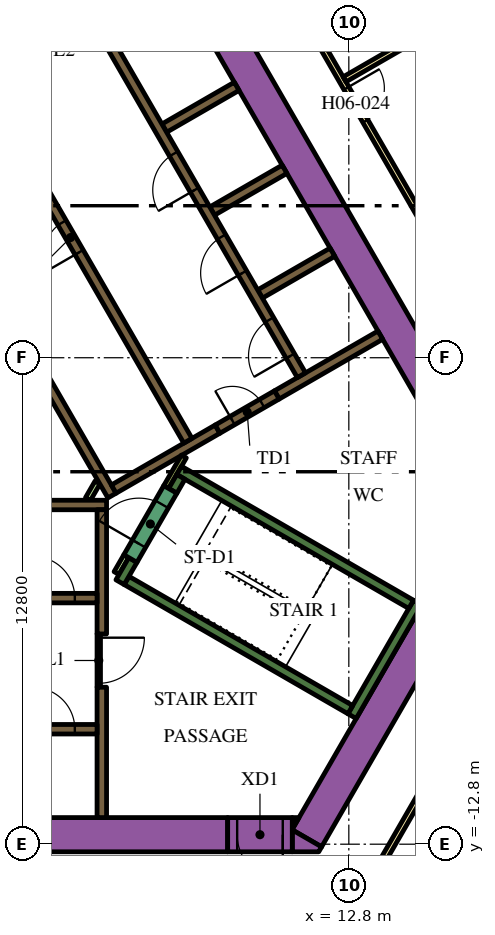
"""IFC4 building model, lengths in metres.
Left out: names, types, materials, properties, quantities, classifications, styles, units other than length and angle.
Written with IfcOpenShell. Run it as: python <this file> out.ifc"""

import sys

from ifc_helpers import new_model, si_unit, direction, frame, frame_2d, origin, place, context, subcontext, project, spatial, polyline, rectangle, outline, extrude, element, fill, save


model = new_model("IFC4")
c1 = context("Model", 3, precision=1e-05, world=origin(), true_north=direction((0.0, 1.0)))
c2 = subcontext(c1, "Body", "Model", "MODEL_VIEW")
j1 = project(units=[si_unit("LENGTHUNIT", "METRE"), si_unit("PLANEANGLEUNIT", "RADIAN")], contexts=[c1])
p1 = place(None, origin())
s1 = spatial("IfcSite", under=j1, at=p1, CompositionType="ELEMENT")
p2 = place(p1, origin())
s2 = spatial("IfcBuilding", under=s1, at=p2, CompositionType="ELEMENT")
p3 = place(p2, frame((0.0, 0.0, 87.6)))
s3 = spatial("IfcBuildingStorey", under=s2, at=p3, CompositionType="ELEMENT", Elevation=87.6)
p4 = place(p3, frame((6.776, 13.364, 0.0), z_axis=(0.0, 0.0, 1.0), x_axis=(0.500004177138, -0.8660229921, 0.0)))
e1 = element("IfcWall", 1, at=p4, inside=s3, PredefinedType="SOLIDWALL", context=c2, shape_type="SweptSolid", body=[
    extrude(rectangle(XDim=20.204, YDim=0.9, at=frame_2d((10.102, 0.0))), origin(), (0.0, 0.0, 1.0), 3.9),
])
p5 = place(p3, frame((11.695, -12.644, 0.0), z_axis=(0.0, 0.0, 1.0), x_axis=(0.500010229568, 0.86601949766, 0.0)))
e2 = element("IfcWall", 2, at=p5, inside=s3, PredefinedType="SOLIDWALL", context=c2, shape_type="SweptSolid", body=[
    extrude(rectangle(XDim=9.326, YDim=0.9, at=frame_2d((4.663, 0.0))), origin(), (0.0, 0.0, 1.0), 3.9),
])
p6 = place(p3, origin())
e3 = element("IfcWall", 3, at=p6, inside=s3, PredefinedType="SOLIDWALL", context=c2, shape_type="SweptSolid", body=[
    extrude(outline(polyline([(12.009, -13.0), (11.312, -13.0), (11.312, -12.425), (12.083, -12.871), (12.009, -13.0)])), origin(), (0.0, 0.0, 1.0), 3.9),
])
e4 = element("IfcWall", 4, at=p6, inside=s3, PredefinedType="SOLIDWALL", context=c2, shape_type="SweptSolid", body=[
    extrude(outline(polyline([(11.489, -12.1), (11.312, -12.407), (11.312, -12.1), (11.489, -12.1)])), origin(), (0.0, 0.0, 1.0), 3.9),
])
p7 = place(p3, frame((-12.019, -12.55, 0.0), z_axis=(0.0, 0.0, 1.0), x_axis=(1.0, 0.0, 0.0)))
e5 = element("IfcWall", 5, at=p7, inside=s3, PredefinedType="SOLIDWALL", context=c2, shape_type="SweptSolid", body=[
    extrude(rectangle(XDim=21.63, YDim=0.9, at=frame_2d((10.815, 0.0))), origin(), (0.0, 0.0, 1.0), 3.9),
])
p8 = place(p3, frame((12.885, -9.431, 0.0), z_axis=(0.0, 0.0, 1.0), x_axis=(0.500020560727, 0.866013532718, 0.0)))
e6 = element("IfcWall", 6, at=p8, inside=s3, PredefinedType="SOLIDWALL", context=c2, shape_type="SweptSolid", body=[
    extrude(rectangle(XDim=3.45, YDim=0.25, at=frame_2d((1.725, 0.0))), origin(), (0.0, 0.0, 1.0), 3.9),
])
p9 = place(p3, frame((12.84, -9.261, 0.0), z_axis=(0.0, 0.0, 1.0), x_axis=(-0.866013990052, 0.500019768644, 0.0)))
e7 = element("IfcWall", 7, at=p9, inside=s3, PredefinedType="SOLIDWALL", context=c2, shape_type="SweptSolid", body=[
    extrude(rectangle(XDim=6.8, YDim=0.25, at=frame_2d((3.4, 0.0))), origin(), (0.0, 0.0, 1.0), 3.9),
])
p10 = place(p3, frame((6.78, -5.906, 0.0), z_axis=(0.0, 0.0, 1.0), x_axis=(0.500223362819, 0.865896406789, 0.0)))
e8 = element("IfcWall", 8, at=p10, inside=s3, PredefinedType="SOLIDWALL", context=c2, shape_type="SweptSolid", body=[
    extrude(rectangle(XDim=0.675, YDim=0.25, at=frame_2d((0.337, 0.0))), origin(), (0.0, 0.0, 1.0), 3.9),
])
p11 = place(p3, frame((8.334, -2.964, 0.0), z_axis=(0.0, 0.0, 1.0), x_axis=(0.866016039709, -0.500016218704, 0.0)))
e9 = element("IfcWall", 9, at=p11, inside=s3, PredefinedType="SOLIDWALL", context=c2, shape_type="SweptSolid", body=[
    extrude(rectangle(XDim=7.05, YDim=0.25, at=frame_2d((3.525, 0.0))), origin(), (0.0, 0.0, 1.0), 3.9),
])
p12 = place(p3, frame((8.168, -3.503, 0.0), z_axis=(0.0, 0.0, 1.0), x_axis=(0.49972245349, 0.866185586049, 0.0)))
e10 = element("IfcWall", 10, at=p12, inside=s3, PredefinedType="SOLIDWALL", context=c2, shape_type="SweptSolid", body=[
    extrude(rectangle(XDim=0.425, YDim=0.25, at=frame_2d((0.212, 0.0))), origin(), (0.0, 0.0, 1.0), 3.9),
])
p13 = place(p3, frame((-5.845, -3.875, 0.0), z_axis=(0.0, 0.0, 1.0), x_axis=(1.0, 0.0, 0.0)))
e11 = element("IfcWall", 11, at=p13, inside=s3, PredefinedType="SOLIDWALL", context=c2, shape_type="SweptSolid", body=[
    extrude(rectangle(XDim=12.27, YDim=0.25, at=frame_2d((6.135, 0.0))), origin(), (0.0, 0.0, 1.0), 3.9),
])
p14 = place(p3, frame((6.3, -8.67, 0.0), z_axis=(0.0, 0.0, 1.0), x_axis=(0.0, -1.0, 0.0)))
e12 = element("IfcWall", 12, at=p14, inside=s3, PredefinedType="SOLIDWALL", context=c2, shape_type="SweptSolid", body=[
    extrude(rectangle(XDim=3.43, YDim=0.25, at=frame_2d((1.715, 0.0))), origin(), (0.0, 0.0, 1.0), 3.9),
])
p15 = place(p3, frame((6.3, -7.268, 0.0), z_axis=(0.0, 0.0, 1.0), x_axis=(0.0, 1.0, 0.0)))
e13 = element("IfcWall", 13, at=p15, inside=s3, PredefinedType="SOLIDWALL", context=c2, shape_type="SweptSolid", body=[
    extrude(rectangle(XDim=3.268, YDim=0.25, at=frame_2d((1.634, 0.0))), origin(), (0.0, 0.0, 1.0), 3.9),
])
p16 = place(p3, frame((10.464, 1.677, 0.0), z_axis=(0.0, 0.0, 1.0), x_axis=(0.86605622881, 0.499946605688, 0.0)))
e14 = element("IfcWall", 14, at=p16, inside=s3, PredefinedType="SOLIDWALL", context=c2, shape_type="SweptSolid", body=[
    extrude(rectangle(XDim=2.2, YDim=0.25, at=frame_2d((1.1, 0.0))), origin(), (0.0, 0.0, 1.0), 3.9),
])
p17 = place(p3, frame((13.629, 0.594, 0.0), z_axis=(0.0, 0.0, 1.0), x_axis=(-0.86602790099, -0.499995674689, 0.0)))
e15 = element("IfcWall", 15, at=p17, inside=s3, PredefinedType="SOLIDWALL", context=c2, shape_type="SweptSolid", body=[
    extrude(rectangle(XDim=3.146, YDim=0.25, at=frame_2d((1.573, 0.0))), origin(), (0.0, 0.0, 1.0), 3.9),
])
e16 = element("IfcWall", 16, at=p6, inside=s3, PredefinedType="SOLIDWALL", context=c2, shape_type="SweptSolid", body=[
    extrude(outline(polyline([(0.335, 6.925), (0.335, 7.075), (0.335, 7.075), (0.335, 7.075), (0.245, 7.075), (0.079, 7.363), (0.035, 7.439), (0.252, 7.564), (0.377, 7.348), (6.552, -3.348), (6.677, -3.564), (6.46, -3.689), (4.897, -0.981), (0.332, 6.925), (0.335, 6.925), (0.335, 6.925), (0.335, 6.925)])), origin(), (0.0, 0.0, 1.0), 3.9),
])
p18 = place(p3, frame((6.614, -3.456, 0.0), z_axis=(0.0, 0.0, 1.0), x_axis=(0.86602447079, 0.500001615989, 0.0)))
e17 = element("IfcWall", 17, at=p18, inside=s3, PredefinedType="SOLIDWALL", context=c2, shape_type="SweptSolid", body=[
    extrude(rectangle(XDim=3.154, YDim=0.25, at=frame_2d((1.577, 0.0))), origin(), (0.0, 0.0, 1.0), 3.9),
])
for number, where, z_axis, x_axis in (
    (18, (7.944, 6.041, 0.0), (0.0, 0.0, 1.0), (0.866, 0.5, 0.0)),
    (19, (9.204, 3.859, 0.0), (0.0, 0.0, 1.0), (0.866, 0.5, 0.0)),
):
    element("IfcWall", number, at=place(p3, frame(where, z_axis=z_axis, x_axis=x_axis)), inside=s3, PredefinedType="SOLIDWALL", context=c2, shape_type="SweptSolid", body=[
        extrude(rectangle(XDim=2.2, YDim=0.25, at=frame_2d((1.1, 0.0))), origin(), (0.0, 0.0, 1.0), 3.9),
    ])
p19 = place(p3, frame((6.945, -5.222, 0.0), z_axis=(0.0, 0.0, 1.0), x_axis=(-0.499818422106, -0.866130212453, 0.0)))
e20 = element("IfcWall", 20, at=p19, inside=s3, PredefinedType="PARTITIONING", context=c2, shape_type="SweptSolid", body=[
    extrude(rectangle(XDim=0.514, YDim=0.15, at=frame_2d((0.257, 0.0))), origin(), (0.0, 0.0, 1.0), 2.75),
])
p20 = place(p3, frame((5.936, -3.718, 0.0), z_axis=(0.0, 0.0, 1.0), x_axis=(0.499890179513, 0.866088799389, 0.0)))
e21 = element("IfcWall", 21, at=p20, inside=s3, PredefinedType="PARTITIONING", context=c2, shape_type="SweptSolid", body=[
    extrude(rectangle(XDim=0.504, YDim=0.15, at=frame_2d((0.252, 0.0))), origin(), (0.0, 0.0, 1.0), 2.75),
])
p21 = place(p3, frame((8.459, -2.599, 0.0), z_axis=(0.0, 0.0, 1.0), x_axis=(-0.500041054325, -0.866001699761, 0.0)))
e22 = element("IfcWall", 22, at=p21, inside=s3, PredefinedType="PARTITIONING", context=c2, shape_type="SweptSolid", body=[
    extrude(rectangle(XDim=0.929, YDim=0.15, at=frame_2d((0.464, 0.0))), origin(), (0.0, 0.0, 1.0), 3.9),
])
p22 = place(p3, frame((-6.175, -9.775, 0.0), z_axis=(0.0, 0.0, 1.0), x_axis=(1.0, 0.0, 0.0)))
e23 = element("IfcWall", 23, at=p22, inside=s3, PredefinedType="SOLIDWALL", context=c2, shape_type="SweptSolid", body=[
    extrude(rectangle(XDim=12.35, YDim=0.25, at=frame_2d((6.175, 0.0))), origin(), (0.0, 0.0, 1.0), 3.9),
])
p23 = place(p22, frame((0.585, 0.0, 0.0)))
e24 = element("IfcOpeningElement", 24, at=p23, cuts=e23, PredefinedType="OPENING", context=c2, shape_type="SweptSolid", body=[
    extrude(rectangle(XDim=1.1, YDim=2.1, at=frame_2d((0.55, 1.05))), frame((0.0, 0.135, 0.0), z_axis=(0.0, -1.0, 0.0), x_axis=(1.0, 0.0, 0.0)), (0.0, 0.0, 1.0), 0.27),
])
p24 = place(p22, frame((3.105, 0.0, 0.0)))
e25 = element("IfcOpeningElement", 25, at=p24, cuts=e23, PredefinedType="OPENING", context=c2, shape_type="SweptSolid", body=[
    extrude(rectangle(XDim=1.1, YDim=2.1, at=frame_2d((0.55, 1.05))), frame((0.0, 0.135, 0.0), z_axis=(0.0, -1.0, 0.0), x_axis=(1.0, 0.0, 0.0)), (0.0, 0.0, 1.0), 0.27),
])
p25 = place(p22, frame((5.625, 0.0, 0.0)))
e26 = element("IfcOpeningElement", 26, at=p25, cuts=e23, PredefinedType="OPENING", context=c2, shape_type="SweptSolid", body=[
    extrude(rectangle(XDim=1.1, YDim=2.1, at=frame_2d((0.55, 1.05))), frame((0.0, 0.135, 0.0), z_axis=(0.0, -1.0, 0.0), x_axis=(1.0, 0.0, 0.0)), (0.0, 0.0, 1.0), 0.27),
])
p26 = place(p22, frame((8.145, 0.0, 0.0)))
e27 = element("IfcOpeningElement", 27, at=p26, cuts=e23, PredefinedType="OPENING", context=c2, shape_type="SweptSolid", body=[
    extrude(rectangle(XDim=1.1, YDim=2.1, at=frame_2d((0.55, 1.05))), frame((0.0, 0.135, 0.0), z_axis=(0.0, -1.0, 0.0), x_axis=(1.0, 0.0, 0.0)), (0.0, 0.0, 1.0), 0.27),
])
p27 = place(p22, frame((10.665, 0.0, 0.0)))
e28 = element("IfcOpeningElement", 28, at=p27, cuts=e23, PredefinedType="OPENING", context=c2, shape_type="SweptSolid", body=[
    extrude(rectangle(XDim=1.1, YDim=2.1, at=frame_2d((0.55, 1.05))), frame((0.0, 0.135, 0.0), z_axis=(0.0, -1.0, 0.0), x_axis=(1.0, 0.0, 0.0)), (0.0, 0.0, 1.0), 0.27),
])
p28 = place(p3, frame((-6.175, -6.325, 0.0), z_axis=(0.0, 0.0, 1.0), x_axis=(1.0, 0.0, 0.0)))
e29 = element("IfcWall", 29, at=p28, inside=s3, PredefinedType="SOLIDWALL", context=c2, shape_type="SweptSolid", body=[
    extrude(rectangle(XDim=12.35, YDim=0.25, at=frame_2d((6.175, 0.0))), origin(), (0.0, 0.0, 1.0), 3.9),
])
p29 = place(p28, frame((3.205, 0.0, 0.0)))
e30 = element("IfcOpeningElement", 30, at=p29, cuts=e29, PredefinedType="OPENING", context=c2, shape_type="SweptSolid", body=[
    extrude(rectangle(XDim=0.9, YDim=2.1, at=frame_2d((0.45, 1.05))), frame((0.0, 0.135, 0.0), z_axis=(0.0, -1.0, 0.0), x_axis=(1.0, 0.0, 0.0)), (0.0, 0.0, 1.0), 0.27),
])
p30 = place(p28, frame((8.145, 0.0, 0.0)))
e31 = element("IfcOpeningElement", 31, at=p30, cuts=e29, PredefinedType="OPENING", context=c2, shape_type="SweptSolid", body=[
    extrude(rectangle(XDim=1.1, YDim=2.1, at=frame_2d((0.55, 1.05))), frame((0.0, 0.135, 0.0), z_axis=(0.0, -1.0, 0.0), x_axis=(1.0, 0.0, 0.0)), (0.0, 0.0, 1.0), 0.27),
])
p31 = place(p28, frame((10.665, 0.0, 0.0)))
e32 = element("IfcOpeningElement", 32, at=p31, cuts=e29, PredefinedType="OPENING", context=c2, shape_type="SweptSolid", body=[
    extrude(rectangle(XDim=1.1, YDim=2.1, at=frame_2d((0.55, 1.05))), frame((0.0, 0.135, 0.0), z_axis=(0.0, -1.0, 0.0), x_axis=(1.0, 0.0, 0.0)), (0.0, 0.0, 1.0), 0.27),
])
p32 = place(p3, frame((11.553, -0.46, 0.0), z_axis=(0.0, 0.0, 1.0), x_axis=(-0.500006514828, 0.866021642414, 0.0)))
e33 = element("IfcWall", 33, at=p32, inside=s3, PredefinedType="SOLIDWALL", context=c2, shape_type="SweptSolid", body=[
    extrude(rectangle(XDim=12.35, YDim=0.25, at=frame_2d((6.175, 0.0))), origin(), (0.0, 0.0, 1.0), 3.9),
])
p33 = place(p32, frame((0.585, 0.0, 0.0)))
e34 = element("IfcOpeningElement", 34, at=p33, cuts=e33, PredefinedType="OPENING", context=c2, shape_type="SweptSolid", body=[
    extrude(rectangle(XDim=1.1, YDim=2.1, at=frame_2d((0.55, 1.05))), frame((0.0, 0.135, 0.0), z_axis=(0.0, -1.0, 0.0), x_axis=(1.0, 0.0, 0.0)), (0.0, 0.0, 1.0), 0.27),
])
p34 = place(p32, frame((3.105, 0.0, 0.0)))
e35 = element("IfcOpeningElement", 35, at=p34, cuts=e33, PredefinedType="OPENING", context=c2, shape_type="SweptSolid", body=[
    extrude(rectangle(XDim=1.1, YDim=2.1, at=frame_2d((0.55, 1.05))), frame((0.0, 0.135, 0.0), z_axis=(0.0, -1.0, 0.0), x_axis=(1.0, 0.0, 0.0)), (0.0, 0.0, 1.0), 0.27),
])
p35 = place(p32, frame((5.625, 0.0, 0.0)))
e36 = element("IfcOpeningElement", 36, at=p35, cuts=e33, PredefinedType="OPENING", context=c2, shape_type="SweptSolid", body=[
    extrude(rectangle(XDim=1.1, YDim=2.1, at=frame_2d((0.55, 1.05))), frame((0.0, 0.135, 0.0), z_axis=(0.0, -1.0, 0.0), x_axis=(1.0, 0.0, 0.0)), (0.0, 0.0, 1.0), 0.27),
])
p36 = place(p3, frame((8.565, -2.185, 0.0), z_axis=(0.0, 0.0, 1.0), x_axis=(-0.499997954832, 0.866026584559, 0.0)))
e37 = element("IfcWall", 37, at=p36, inside=s3, PredefinedType="SOLIDWALL", context=c2, shape_type="SweptSolid", body=[
    extrude(rectangle(XDim=12.35, YDim=0.25, at=frame_2d((6.175, 0.0))), origin(), (0.0, 0.0, 1.0), 3.9),
])
p37 = place(p36, frame((5.725, 0.0, 0.0)))
e38 = element("IfcOpeningElement", 38, at=p37, cuts=e37, PredefinedType="OPENING", context=c2, shape_type="SweptSolid", body=[
    extrude(rectangle(XDim=0.9, YDim=2.1, at=frame_2d((0.45, 1.05))), frame((0.0, 0.135, 0.0), z_axis=(0.0, -1.0, 0.0), x_axis=(1.0, 0.0, 0.0)), (0.0, 0.0, 1.0), 0.27),
])
p38 = place(p3, frame((7.053, -5.284, 0.0), z_axis=(0.0, 0.0, 1.0), x_axis=(0.500078061341, 0.865980330357, 0.0)))
e39 = element("IfcWall", 39, at=p38, inside=s3, PredefinedType="SOLIDWALL", context=c2, shape_type="SweptSolid", body=[
    extrude(rectangle(XDim=2.1, YDim=0.4, at=frame_2d((1.05, 0.0))), origin(), (0.0, 0.0, 1.0), 3.9),
])
p39 = place(p38, frame((0.45, 0.0, 0.0)))
e40 = element("IfcOpeningElement", 40, at=p39, cuts=e39, PredefinedType="OPENING", context=c2, shape_type="SweptSolid", body=[
    extrude(rectangle(XDim=1.2, YDim=2.1, at=frame_2d((0.6, 1.05))), frame((0.0, 0.21, 0.0), z_axis=(0.0, -1.0, 0.0), x_axis=(1.0, 0.0, 0.0)), (0.0, 0.0, 1.0), 0.42),
])
p40 = place(p3, frame((9.346, -1.879, 0.0), z_axis=(0.0, 0.0, 1.0), x_axis=(0.866047807691, 0.499961193289, 0.0)))
e41 = element("IfcWall", 41, at=p40, inside=s3, PredefinedType="SOLIDWALL", context=c2, shape_type="SweptSolid", body=[
    extrude(rectangle(XDim=1.8, YDim=0.25, at=frame_2d((0.9, 0.0))), origin(), (0.0, 0.0, 1.0), 3.9),
])
p41 = place(p40, frame((0.45, 0.0, 0.0)))
e42 = element("IfcOpeningElement", 42, at=p41, cuts=e41, PredefinedType="OPENING", context=c2, shape_type="SweptSolid", body=[
    extrude(rectangle(XDim=0.9, YDim=2.1, at=frame_2d((0.45, 1.05))), frame((0.0, 0.135, 0.0), z_axis=(0.0, -1.0, 0.0), x_axis=(1.0, 0.0, 0.0)), (0.0, 0.0, 1.0), 0.27),
])
p42 = place(p3, frame((6.22, -7.266, 0.0), z_axis=(0.0, 0.0, 1.0), x_axis=(0.0, -1.0, 0.0)))
e43 = element("IfcWall", 43, at=p42, inside=s3, PredefinedType="PARTITIONING", context=c2, shape_type="SweptSolid", body=[
    extrude(rectangle(XDim=1.4, YDim=0.09, at=frame_2d((0.7, 0.0))), origin(), (0.0, 0.0, 1.0), 2.75),
])
p43 = place(p42, frame((0.1, 0.0, 0.0)))
e44 = element("IfcOpeningElement", 44, at=p43, cuts=e43, PredefinedType="OPENING", context=c2, shape_type="SweptSolid", body=[
    extrude(rectangle(XDim=1.2, YDim=2.1, at=frame_2d((0.6, 1.05))), frame((0.0, 0.055, 0.0), z_axis=(0.0, -1.0, 0.0), x_axis=(1.0, 0.0, 0.0)), (0.0, 0.0, 1.0), 0.11),
])
p44 = place(p3, frame((11.312, -12.55, 0.0), z_axis=(0.0, 0.0, 1.0), x_axis=(-1.0, 0.0, 0.0)))
e45 = element("IfcWall", 45, at=p44, inside=s3, PredefinedType="SOLIDWALL", context=c2, shape_type="SweptSolid", body=[
    extrude(rectangle(XDim=1.7, YDim=0.9, at=frame_2d((0.85, 0.0))), origin(), (0.0, 0.0, 1.0), 3.9),
])
p45 = place(p44, frame((0.25, 0.0, 0.0)))
e46 = element("IfcOpeningElement", 46, at=p45, cuts=e45, PredefinedType="OPENING", context=c2, shape_type="SweptSolid", body=[
    extrude(rectangle(XDim=1.2, YDim=2.1, at=frame_2d((0.6, 1.05))), frame((0.0, 0.46, 0.0), z_axis=(0.0, -1.0, 0.0), x_axis=(1.0, 0.0, 0.0)), (0.0, 0.0, 1.0), 0.92),
])
p46 = place(p3, frame((6.163, 18.475, 0.0), z_axis=(0.0, 0.0, 1.0), x_axis=(0.500001317485, -0.866024643133, 0.0)))
e47 = element("IfcWall", 47, at=p46, inside=s3, PredefinedType="PARTITIONING", context=c2, shape_type="SweptSolid", body=[
    extrude(rectangle(XDim=25.767, YDim=0.15, at=frame_2d((12.883, 0.0))), origin(), (0.0, 0.0, 1.0), 2.75),
])
p47 = place(p46, frame((24.241, 0.0, 0.0)))
e48 = element("IfcOpeningElement", 48, at=p47, cuts=e47, PredefinedType="OPENING", context=c2, shape_type="SweptSolid", body=[
    extrude(rectangle(XDim=1.0, YDim=2.1, at=frame_2d((0.5, 1.05))), frame((0.0, 0.085, 0.0), z_axis=(0.0, -1.0, 0.0), x_axis=(1.0, 0.0, 0.0)), (0.0, 0.0, 1.0), 0.17),
])
p48 = place(p46, frame((13.144, 0.0, 0.0)))
e49 = element("IfcOpeningElement", 49, at=p48, cuts=e47, PredefinedType="OPENING", context=c2, shape_type="SweptSolid", body=[
    extrude(rectangle(XDim=1.0, YDim=2.1, at=frame_2d((0.5, 1.05))), frame((0.0, 0.085, 0.0), z_axis=(0.0, -1.0, 0.0), x_axis=(1.0, 0.0, 0.0)), (0.0, 0.0, 1.0), 0.17),
])
p49 = place(p46, frame((10.874, 0.0, 0.0)))
e50 = element("IfcOpeningElement", 50, at=p49, cuts=e47, PredefinedType="OPENING", context=c2, shape_type="SweptSolid", body=[
    extrude(rectangle(XDim=0.9, YDim=2.1, at=frame_2d((0.45, 1.05))), frame((0.0, 0.085, 0.0), z_axis=(0.0, -1.0, 0.0), x_axis=(1.0, 0.0, 0.0)), (0.0, 0.0, 1.0), 0.17),
])
p50 = place(p46, frame((3.718, 0.0, 0.0)))
e51 = element("IfcOpeningElement", 51, at=p50, cuts=e47, PredefinedType="OPENING", context=c2, shape_type="SweptSolid", body=[
    extrude(rectangle(XDim=1.1, YDim=2.1, at=frame_2d((0.55, 1.05))), frame((0.0, 0.085, 0.0), z_axis=(0.0, -1.0, 0.0), x_axis=(1.0, 0.0, 0.0)), (0.0, 0.0, 1.0), 0.17),
])
p51 = place(p46, frame((2.411, 0.0, 0.0)))
e52 = element("IfcOpeningElement", 52, at=p51, cuts=e47, PredefinedType="OPENING", context=c2, shape_type="SweptSolid", body=[
    extrude(rectangle(XDim=1.0, YDim=2.1, at=frame_2d((0.5, 1.05))), frame((0.0, 0.085, 0.0), z_axis=(0.0, -1.0, 0.0), x_axis=(1.0, 0.0, 0.0)), (0.0, 0.0, 1.0), 0.17),
])
p52 = place(p3, frame((15.587, -9.952, 0.0), z_axis=(0.0, 0.0, 1.0), x_axis=(-0.500016618951, -0.866015808616, 0.0)))
e53 = element("IfcWall", 53, at=p52, inside=s3, PredefinedType="PARTITIONING", context=c2, shape_type="SweptSolid", body=[
    extrude(rectangle(XDim=5.268, YDim=0.15, at=frame_2d((2.634, 0.0))), origin(), (0.0, 0.0, 1.0), 2.75),
])
p53 = place(p3, frame((18.484, 10.672, 0.0), z_axis=(0.0, 0.0, 1.0), x_axis=(-0.866019162053, -0.50001081084, 0.0)))
e54 = element("IfcWall", 54, at=p53, inside=s3, PredefinedType="PARTITIONING", context=c2, shape_type="SweptSolid", body=[
    extrude(rectangle(XDim=6.694, YDim=0.15, at=frame_2d((3.347, 0.0))), origin(), (0.0, 0.0, 1.0), 2.75),
])
p54 = place(p27, origin())
e55 = element("IfcDoor", 55, at=p54, inside=s3, OperationType="DOUBLE_DOOR_SLIDING", PredefinedType="DOOR", context=c2, shape_type="SweptSolid", body=[
    extrude(rectangle(XDim=1.1, YDim=2.1, at=frame_2d((0.55, 1.05))), frame((0.0, 0.025, 0.0), z_axis=(0.0, -1.0, 0.0), x_axis=(1.0, 0.0, 0.0)), (0.0, 0.0, 1.0), 0.05),
])
fill(e28, e55)
p55 = place(p31, origin())
e56 = element("IfcDoor", 56, at=p55, inside=s3, OperationType="DOUBLE_DOOR_SLIDING", PredefinedType="DOOR", context=c2, shape_type="SweptSolid", body=[
    extrude(rectangle(XDim=1.1, YDim=2.1, at=frame_2d((0.55, 1.05))), frame((0.0, 0.025, 0.0), z_axis=(0.0, -1.0, 0.0), x_axis=(1.0, 0.0, 0.0)), (0.0, 0.0, 1.0), 0.05),
])
fill(e32, e56)
p56 = place(p33, origin())
e57 = element("IfcDoor", 57, at=p56, inside=s3, OperationType="DOUBLE_DOOR_SLIDING", PredefinedType="DOOR", context=c2, shape_type="SweptSolid", body=[
    extrude(rectangle(XDim=1.1, YDim=2.1, at=frame_2d((0.55, 1.05))), frame((0.0, 0.025, 0.0), z_axis=(0.0, -1.0, 0.0), x_axis=(1.0, 0.0, 0.0)), (0.0, 0.0, 1.0), 0.05),
])
fill(e34, e57)
p57 = place(p34, origin())
e58 = element("IfcDoor", 58, at=p57, inside=s3, OperationType="DOUBLE_DOOR_SLIDING", PredefinedType="DOOR", context=c2, shape_type="SweptSolid", body=[
    extrude(rectangle(XDim=1.1, YDim=2.1, at=frame_2d((0.55, 1.05))), frame((0.0, 0.025, 0.0), z_axis=(0.0, -1.0, 0.0), x_axis=(1.0, 0.0, 0.0)), (0.0, 0.0, 1.0), 0.05),
])
fill(e35, e58)
p58 = place(p35, origin())
e59 = element("IfcDoor", 59, at=p58, inside=s3, OperationType="DOUBLE_DOOR_SLIDING", PredefinedType="DOOR", context=c2, shape_type="SweptSolid", body=[
    extrude(rectangle(XDim=1.1, YDim=2.1, at=frame_2d((0.55, 1.05))), frame((0.0, 0.025, 0.0), z_axis=(0.0, -1.0, 0.0), x_axis=(1.0, 0.0, 0.0)), (0.0, 0.0, 1.0), 0.05),
])
fill(e36, e59)
p59 = place(p37, origin())
e60 = element("IfcDoor", 60, at=p59, inside=s3, OperationType="SINGLE_SWING_LEFT", PredefinedType="DOOR", context=c2, shape_type="SweptSolid", body=[
    extrude(rectangle(XDim=0.9, YDim=2.1, at=frame_2d((0.45, 1.05))), frame((0.0, 0.025, 0.0), z_axis=(0.0, -1.0, 0.0), x_axis=(1.0, 0.0, 0.0)), (0.0, 0.0, 1.0), 0.05),
])
fill(e38, e60)
p60 = place(p39, origin())
e61 = element("IfcDoor", 61, at=p60, inside=s3, OperationType="SINGLE_SWING_LEFT", PredefinedType="DOOR", context=c2, shape_type="SweptSolid", body=[
    extrude(rectangle(XDim=1.2, YDim=2.1, at=frame_2d((0.6, 1.05))), frame((0.0, 0.025, 0.0), z_axis=(0.0, -1.0, 0.0), x_axis=(1.0, 0.0, 0.0)), (0.0, 0.0, 1.0), 0.05),
])
fill(e40, e61)
p61 = place(p41, origin())
e62 = element("IfcDoor", 62, at=p61, inside=s3, OperationType="SINGLE_SWING_LEFT", PredefinedType="DOOR", context=c2, shape_type="SweptSolid", body=[
    extrude(rectangle(XDim=0.9, YDim=2.1, at=frame_2d((0.45, 1.05))), frame((0.0, 0.025, 0.0), z_axis=(0.0, -1.0, 0.0), x_axis=(1.0, 0.0, 0.0)), (0.0, 0.0, 1.0), 0.05),
])
fill(e42, e62)
p62 = place(p43, origin())
e63 = element("IfcDoor", 63, at=p62, inside=s3, OperationType="SINGLE_SWING_LEFT", PredefinedType="DOOR", context=c2, shape_type="SweptSolid", body=[
    extrude(rectangle(XDim=1.2, YDim=2.1, at=frame_2d((0.6, 1.05))), frame((0.0, 0.025, 0.0), z_axis=(0.0, -1.0, 0.0), x_axis=(1.0, 0.0, 0.0)), (0.0, 0.0, 1.0), 0.05),
])
fill(e44, e63)
p63 = place(p45, origin())
e64 = element("IfcDoor", 64, at=p63, inside=s3, OperationType="SINGLE_SWING_LEFT", PredefinedType="DOOR", context=c2, shape_type="SweptSolid", body=[
    extrude(rectangle(XDim=1.2, YDim=2.1, at=frame_2d((0.6, 1.05))), frame((0.0, 0.025, 0.0), z_axis=(0.0, -1.0, 0.0), x_axis=(1.0, 0.0, 0.0)), (0.0, 0.0, 1.0), 0.05),
])
fill(e46, e64)
p64 = place(p48, origin())
e65 = element("IfcDoor", 65, at=p64, inside=s3, OperationType="SINGLE_SWING_LEFT", PredefinedType="DOOR", context=c2, shape_type="SweptSolid", body=[
    extrude(rectangle(XDim=1.0, YDim=2.1, at=frame_2d((0.5, 1.05))), frame((0.0, 0.025, 0.0), z_axis=(0.0, -1.0, 0.0), x_axis=(1.0, 0.0, 0.0)), (0.0, 0.0, 1.0), 0.05),
])
fill(e49, e65)
save(model, sys.argv[1])
